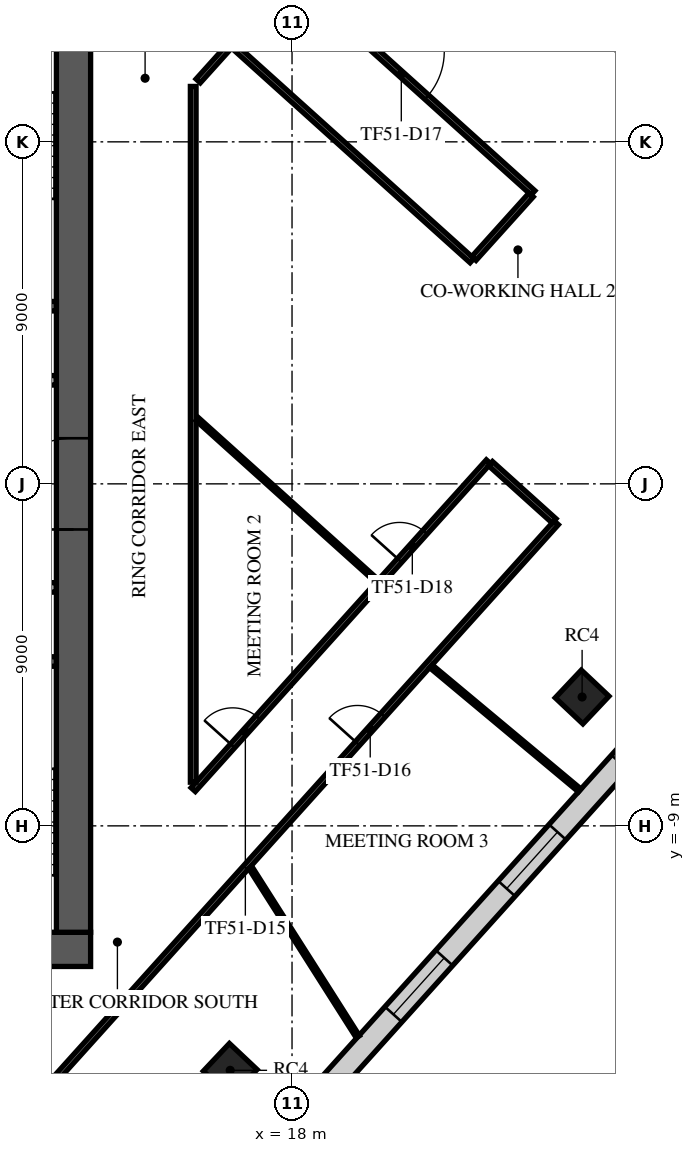
"""IFC4 building model, lengths in metres.
Left out: names, types, materials, properties, quantities, classifications, styles, units other than length and angle.
Written with IfcOpenShell. Run it as: python <this file> out.ifc"""

import sys

from ifc_helpers import new_model, si_unit, direction, frame, frame_2d, origin, origin_2d, place, context, subcontext, project, spatial, rectangle, extrude, element, fill, save


model = new_model("IFC4")
c1 = context("Model", 3, precision=1e-05, world=origin(), true_north=direction((0.0, 1.0)))
c2 = subcontext(c1, "Body", "Model", "MODEL_VIEW")
j1 = project(units=[si_unit("LENGTHUNIT", "METRE"), si_unit("PLANEANGLEUNIT", "RADIAN")], contexts=[c1])
p1 = place(None, origin())
s1 = spatial("IfcSite", under=j1, at=p1, CompositionType="ELEMENT")
p2 = place(p1, origin())
s2 = spatial("IfcBuilding", under=s1, at=p2, CompositionType="ELEMENT")
p3 = place(p2, frame((0.0, 0.0, 217.3)))
s3 = spatial("IfcBuildingStorey", under=s2, at=p3, CompositionType="ELEMENT", Elevation=217.3)
for number, where, z_axis, x_axis in (
    (1, (16.373, -15.433, 0.0), (0.0, 0.0, 1.0), (0.686, 0.728, 0.0)),
    (2, (25.633, -5.609, 0.0), (0.0, 0.0, 1.0), (0.686, 0.728, 0.0)),
    (3, (26.706, 11.931, 0.0), (0.0, 0.0, 1.0), (0.686, 0.728, 0.0)),
):
    element("IfcColumn", number, at=place(p3, frame(where, z_axis=z_axis, x_axis=x_axis)), inside=s3, PredefinedType="COLUMN", context=c2, shape_type="SweptSolid", body=[
        extrude(rectangle(XDim=1.0, YDim=1.0, at=origin_2d()), origin(), (0.0, 0.0, 1.0), 4.0),
    ])
p4 = place(p3, frame((-12.7, -12.25, 0.0), z_axis=(0.0, 0.0, 1.0), x_axis=(1.0, 0.0, 0.0)))
e4 = element("IfcWall", 4, at=p4, inside=s3, PredefinedType="SHEAR", context=c2, shape_type="SweptSolid", body=[
    extrude(rectangle(XDim=25.4, YDim=0.9, at=frame_2d((12.7, 0.0))), origin(), (0.0, 0.0, 1.0), 3.62),
])
p5 = place(p4, frame((7.6, 0.0, 0.0)))
e5 = element("IfcOpeningElement", 5, at=p5, cuts=e4, PredefinedType="OPENING", context=c2, shape_type="SweptSolid", body=[
    extrude(rectangle(XDim=2.0, YDim=2.1, at=frame_2d((1.0, 1.05))), frame((0.0, 0.46, 0.0), z_axis=(0.0, -1.0, 0.0), x_axis=(1.0, 0.0, 0.0)), (0.0, 0.0, 1.0), 0.92),
])
p6 = place(p4, frame((17.725, 0.0, 0.0)))
e6 = element("IfcOpeningElement", 6, at=p6, cuts=e4, PredefinedType="OPENING", context=c2, shape_type="SweptSolid", body=[
    extrude(rectangle(XDim=1.2, YDim=2.1, at=frame_2d((0.6, 1.05))), frame((0.0, 0.46, 0.0), z_axis=(0.0, -1.0, 0.0), x_axis=(1.0, 0.0, 0.0)), (0.0, 0.0, 1.0), 0.92),
])
p7 = place(p4, frame((1.875, 0.0, 0.0)))
e7 = element("IfcOpeningElement", 7, at=p7, cuts=e4, PredefinedType="OPENING", context=c2, shape_type="SweptSolid", body=[
    extrude(rectangle(XDim=1.2, YDim=2.1, at=frame_2d((0.6, 1.05))), frame((0.0, 0.46, 0.0), z_axis=(0.0, -1.0, 0.0), x_axis=(1.0, 0.0, 0.0)), (0.0, 0.0, 1.0), 0.92),
])
p8 = place(p4, frame((22.325, 0.0, 0.0)))
e8 = element("IfcOpeningElement", 8, at=p8, cuts=e4, PredefinedType="OPENING", context=c2, shape_type="SweptSolid", body=[
    extrude(rectangle(XDim=1.2, YDim=2.1, at=frame_2d((0.6, 1.05))), frame((0.0, 0.46, 0.0), z_axis=(0.0, -1.0, 0.0), x_axis=(1.0, 0.0, 0.0)), (0.0, 0.0, 1.0), 0.92),
])
p9 = place(p3, frame((12.25, -11.8, 0.0), z_axis=(0.0, 0.0, 1.0), x_axis=(0.0, 1.0, 0.0)))
e9 = element("IfcWall", 9, at=p9, inside=s3, PredefinedType="SHEAR", context=c2, shape_type="SweptSolid", body=[
    extrude(rectangle(XDim=23.6, YDim=0.9, at=frame_2d((11.8, 0.0))), origin(), (0.0, 0.0, 1.0), 3.62),
])
p10 = place(p9, frame((10.6, 0.0, 0.0)))
e10 = element("IfcOpeningElement", 10, at=p10, cuts=e9, PredefinedType="OPENING", context=c2, shape_type="SweptSolid", body=[
    extrude(rectangle(XDim=2.4, YDim=2.4, at=frame_2d((1.2, 1.2))), frame((0.0, 0.46, 0.0), z_axis=(0.0, -1.0, 0.0), x_axis=(1.0, 0.0, 0.0)), (0.0, 0.0, 1.0), 0.92),
])
for number, where, z_axis, x_axis in (
    (11, (8.65, 4.675, 0.0), (0.0, 0.0, 1.0), (1.0, 0.0, 0.0)),
    (12, (8.65, -4.675, 0.0), (0.0, 0.0, 1.0), (1.0, 0.0, 0.0)),
):
    element("IfcWall", number, at=place(p3, frame(where, z_axis=z_axis, x_axis=x_axis)), inside=s3, PredefinedType="SOLIDWALL", context=c2, shape_type="SweptSolid", body=[
        extrude(rectangle(XDim=3.15, YDim=0.25, at=frame_2d((1.575, 0.0))), origin(), (0.0, 0.0, 1.0), 3.62),
    ])
p11 = place(p3, frame((5.63, -2.725, 0.0), z_axis=(0.0, 0.0, 1.0), x_axis=(1.0, 0.0, 0.0)))
e13 = element("IfcWall", 13, at=p11, inside=s3, PredefinedType="PARTITIONING", context=c2, shape_type="SweptSolid", body=[
    extrude(rectangle(XDim=6.165, YDim=0.25, at=frame_2d((3.083, 0.0))), origin(), (0.0, 0.0, 1.0), 3.62),
])
p12 = place(p11, frame((0.745, 0.0, 0.0)))
e14 = element("IfcOpeningElement", 14, at=p12, cuts=e13, PredefinedType="OPENING", context=c2, shape_type="SweptSolid", body=[
    extrude(rectangle(XDim=1.0, YDim=2.1, at=frame_2d((0.5, 1.05))), frame((0.0, 0.135, 0.0), z_axis=(0.0, -1.0, 0.0), x_axis=(1.0, 0.0, 0.0)), (0.0, 0.0, 1.0), 0.27),
])
p13 = place(p11, frame((3.92, 0.0, 0.0)))
e15 = element("IfcOpeningElement", 15, at=p13, cuts=e13, PredefinedType="OPENING", context=c2, shape_type="SweptSolid", body=[
    extrude(rectangle(XDim=0.9, YDim=2.1, at=frame_2d((0.45, 1.05))), frame((0.0, 0.135, 0.0), z_axis=(0.0, -1.0, 0.0), x_axis=(1.0, 0.0, 0.0)), (0.0, 0.0, 1.0), 0.27),
])
p14 = place(p3, frame((8.38, 2.725, 0.0), z_axis=(0.0, 0.0, 1.0), x_axis=(1.0, 0.0, 0.0)))
e16 = element("IfcWall", 16, at=p14, inside=s3, PredefinedType="PARTITIONING", context=c2, shape_type="SweptSolid", body=[
    extrude(rectangle(XDim=3.415, YDim=0.25, at=frame_2d((1.708, 0.0))), origin(), (0.0, 0.0, 1.0), 3.62),
])
p15 = place(p14, frame((1.17, 0.0, 0.0)))
e17 = element("IfcOpeningElement", 17, at=p15, cuts=e16, PredefinedType="OPENING", context=c2, shape_type="SweptSolid", body=[
    extrude(rectangle(XDim=0.9, YDim=2.1, at=frame_2d((0.45, 1.05))), frame((0.0, 0.135, 0.0), z_axis=(0.0, -1.0, 0.0), x_axis=(1.0, 0.0, 0.0)), (0.0, 0.0, 1.0), 0.27),
])
p16 = place(p3, frame((1.962, -34.735, 0.0), z_axis=(0.0, 0.0, 1.0), x_axis=(0.669133181838, 0.743142506497, 0.0)))
e18 = element("IfcWall", 18, at=p16, inside=s3, PredefinedType="STANDARD", context=c2, shape_type="SweptSolid", body=[
    extrude(rectangle(XDim=49.0, YDim=0.6, at=frame_2d((24.5, 0.0))), origin(), (0.0, 0.0, 1.0), 3.62),
])
p17 = place(p16, frame((1.227, 0.0, 0.9)))
e19 = element("IfcOpeningElement", 19, at=p17, cuts=e18, PredefinedType="OPENING", context=c2, shape_type="SweptSolid", body=[
    extrude(rectangle(XDim=2.0, YDim=2.1, at=frame_2d((1.0, 1.05))), frame((0.0, 0.31, 0.0), z_axis=(0.0, -1.0, 0.0), x_axis=(1.0, 0.0, 0.0)), (0.0, 0.0, 1.0), 0.62),
])
p18 = place(p16, frame((5.682, 0.0, 0.9)))
e20 = element("IfcOpeningElement", 20, at=p18, cuts=e18, PredefinedType="OPENING", context=c2, shape_type="SweptSolid", body=[
    extrude(rectangle(XDim=2.0, YDim=2.1, at=frame_2d((1.0, 1.05))), frame((0.0, 0.31, 0.0), z_axis=(0.0, -1.0, 0.0), x_axis=(1.0, 0.0, 0.0)), (0.0, 0.0, 1.0), 0.62),
])
p19 = place(p16, frame((10.136, 0.0, 0.9)))
e21 = element("IfcOpeningElement", 21, at=p19, cuts=e18, PredefinedType="OPENING", context=c2, shape_type="SweptSolid", body=[
    extrude(rectangle(XDim=2.0, YDim=2.1, at=frame_2d((1.0, 1.05))), frame((0.0, 0.31, 0.0), z_axis=(0.0, -1.0, 0.0), x_axis=(1.0, 0.0, 0.0)), (0.0, 0.0, 1.0), 0.62),
])
p20 = place(p16, frame((14.591, 0.0, 0.9)))
e22 = element("IfcOpeningElement", 22, at=p20, cuts=e18, PredefinedType="OPENING", context=c2, shape_type="SweptSolid", body=[
    extrude(rectangle(XDim=2.0, YDim=2.1, at=frame_2d((1.0, 1.05))), frame((0.0, 0.31, 0.0), z_axis=(0.0, -1.0, 0.0), x_axis=(1.0, 0.0, 0.0)), (0.0, 0.0, 1.0), 0.62),
])
p21 = place(p16, frame((19.045, 0.0, 0.9)))
e23 = element("IfcOpeningElement", 23, at=p21, cuts=e18, PredefinedType="OPENING", context=c2, shape_type="SweptSolid", body=[
    extrude(rectangle(XDim=2.0, YDim=2.1, at=frame_2d((1.0, 1.05))), frame((0.0, 0.31, 0.0), z_axis=(0.0, -1.0, 0.0), x_axis=(1.0, 0.0, 0.0)), (0.0, 0.0, 1.0), 0.62),
])
p22 = place(p16, frame((23.5, 0.0, 0.9)))
e24 = element("IfcOpeningElement", 24, at=p22, cuts=e18, PredefinedType="OPENING", context=c2, shape_type="SweptSolid", body=[
    extrude(rectangle(XDim=2.0, YDim=2.1, at=frame_2d((1.0, 1.05))), frame((0.0, 0.31, 0.0), z_axis=(0.0, -1.0, 0.0), x_axis=(1.0, 0.0, 0.0)), (0.0, 0.0, 1.0), 0.62),
])
p23 = place(p16, frame((27.955, 0.0, 0.9)))
e25 = element("IfcOpeningElement", 25, at=p23, cuts=e18, PredefinedType="OPENING", context=c2, shape_type="SweptSolid", body=[
    extrude(rectangle(XDim=2.0, YDim=2.1, at=frame_2d((1.0, 1.05))), frame((0.0, 0.31, 0.0), z_axis=(0.0, -1.0, 0.0), x_axis=(1.0, 0.0, 0.0)), (0.0, 0.0, 1.0), 0.62),
])
p24 = place(p16, frame((32.409, 0.0, 0.9)))
e26 = element("IfcOpeningElement", 26, at=p24, cuts=e18, PredefinedType="OPENING", context=c2, shape_type="SweptSolid", body=[
    extrude(rectangle(XDim=2.0, YDim=2.1, at=frame_2d((1.0, 1.05))), frame((0.0, 0.31, 0.0), z_axis=(0.0, -1.0, 0.0), x_axis=(1.0, 0.0, 0.0)), (0.0, 0.0, 1.0), 0.62),
])
p25 = place(p16, frame((36.864, 0.0, 0.9)))
e27 = element("IfcOpeningElement", 27, at=p25, cuts=e18, PredefinedType="OPENING", context=c2, shape_type="SweptSolid", body=[
    extrude(rectangle(XDim=2.0, YDim=2.1, at=frame_2d((1.0, 1.05))), frame((0.0, 0.31, 0.0), z_axis=(0.0, -1.0, 0.0), x_axis=(1.0, 0.0, 0.0)), (0.0, 0.0, 1.0), 0.62),
])
p26 = place(p16, frame((41.318, 0.0, 0.9)))
e28 = element("IfcOpeningElement", 28, at=p26, cuts=e18, PredefinedType="OPENING", context=c2, shape_type="SweptSolid", body=[
    extrude(rectangle(XDim=2.0, YDim=2.1, at=frame_2d((1.0, 1.05))), frame((0.0, 0.31, 0.0), z_axis=(0.0, -1.0, 0.0), x_axis=(1.0, 0.0, 0.0)), (0.0, 0.0, 1.0), 0.62),
])
p27 = place(p16, frame((45.773, 0.0, 0.9)))
e29 = element("IfcOpeningElement", 29, at=p27, cuts=e18, PredefinedType="OPENING", context=c2, shape_type="SweptSolid", body=[
    extrude(rectangle(XDim=2.0, YDim=2.1, at=frame_2d((1.0, 1.05))), frame((0.0, 0.31, 0.0), z_axis=(0.0, -1.0, 0.0), x_axis=(1.0, 0.0, 0.0)), (0.0, 0.0, 1.0), 0.62),
])
p28 = place(p3, frame((34.365, 9.023, 0.0), z_axis=(0.0, 0.0, 1.0), x_axis=(-0.743146896498, 0.66912830625, 0.0)))
e30 = element("IfcWall", 30, at=p28, inside=s3, PredefinedType="STANDARD", context=c2, shape_type="SweptSolid", body=[
    extrude(rectangle(XDim=39.0, YDim=0.6, at=frame_2d((19.5, 0.0))), origin(), (0.0, 0.0, 1.0), 3.62),
])
p29 = place(p28, frame((1.217, 0.0, 0.9)))
e31 = element("IfcOpeningElement", 31, at=p29, cuts=e30, PredefinedType="OPENING", context=c2, shape_type="SweptSolid", body=[
    extrude(rectangle(XDim=1.9, YDim=2.1, at=frame_2d((0.95, 1.05))), frame((0.0, 0.31, 0.0), z_axis=(0.0, -1.0, 0.0), x_axis=(1.0, 0.0, 0.0)), (0.0, 0.0, 1.0), 0.62),
])
p30 = place(p28, frame((5.55, 0.0, 0.9)))
e32 = element("IfcOpeningElement", 32, at=p30, cuts=e30, PredefinedType="OPENING", context=c2, shape_type="SweptSolid", body=[
    extrude(rectangle(XDim=1.9, YDim=2.1, at=frame_2d((0.95, 1.05))), frame((0.0, 0.31, 0.0), z_axis=(0.0, -1.0, 0.0), x_axis=(1.0, 0.0, 0.0)), (0.0, 0.0, 1.0), 0.62),
])
p31 = place(p28, frame((9.883, 0.0, 0.9)))
e33 = element("IfcOpeningElement", 33, at=p31, cuts=e30, PredefinedType="OPENING", context=c2, shape_type="SweptSolid", body=[
    extrude(rectangle(XDim=1.9, YDim=2.1, at=frame_2d((0.95, 1.05))), frame((0.0, 0.31, 0.0), z_axis=(0.0, -1.0, 0.0), x_axis=(1.0, 0.0, 0.0)), (0.0, 0.0, 1.0), 0.62),
])
p32 = place(p28, frame((14.217, 0.0, 0.9)))
e34 = element("IfcOpeningElement", 34, at=p32, cuts=e30, PredefinedType="OPENING", context=c2, shape_type="SweptSolid", body=[
    extrude(rectangle(XDim=1.9, YDim=2.1, at=frame_2d((0.95, 1.05))), frame((0.0, 0.31, 0.0), z_axis=(0.0, -1.0, 0.0), x_axis=(1.0, 0.0, 0.0)), (0.0, 0.0, 1.0), 0.62),
])
p33 = place(p28, frame((18.55, 0.0, 0.9)))
e35 = element("IfcOpeningElement", 35, at=p33, cuts=e30, PredefinedType="OPENING", context=c2, shape_type="SweptSolid", body=[
    extrude(rectangle(XDim=1.9, YDim=2.1, at=frame_2d((0.95, 1.05))), frame((0.0, 0.31, 0.0), z_axis=(0.0, -1.0, 0.0), x_axis=(1.0, 0.0, 0.0)), (0.0, 0.0, 1.0), 0.62),
])
p34 = place(p28, frame((22.883, 0.0, 0.9)))
e36 = element("IfcOpeningElement", 36, at=p34, cuts=e30, PredefinedType="OPENING", context=c2, shape_type="SweptSolid", body=[
    extrude(rectangle(XDim=1.9, YDim=2.1, at=frame_2d((0.95, 1.05))), frame((0.0, 0.31, 0.0), z_axis=(0.0, -1.0, 0.0), x_axis=(1.0, 0.0, 0.0)), (0.0, 0.0, 1.0), 0.62),
])
p35 = place(p28, frame((27.217, 0.0, 0.9)))
e37 = element("IfcOpeningElement", 37, at=p35, cuts=e30, PredefinedType="OPENING", context=c2, shape_type="SweptSolid", body=[
    extrude(rectangle(XDim=1.9, YDim=2.1, at=frame_2d((0.95, 1.05))), frame((0.0, 0.31, 0.0), z_axis=(0.0, -1.0, 0.0), x_axis=(1.0, 0.0, 0.0)), (0.0, 0.0, 1.0), 0.62),
])
p36 = place(p28, frame((31.55, 0.0, 0.9)))
e38 = element("IfcOpeningElement", 38, at=p36, cuts=e30, PredefinedType="OPENING", context=c2, shape_type="SweptSolid", body=[
    extrude(rectangle(XDim=1.9, YDim=2.1, at=frame_2d((0.95, 1.05))), frame((0.0, 0.31, 0.0), z_axis=(0.0, -1.0, 0.0), x_axis=(1.0, 0.0, 0.0)), (0.0, 0.0, 1.0), 0.62),
])
p37 = place(p28, frame((35.883, 0.0, 0.9)))
e39 = element("IfcOpeningElement", 39, at=p37, cuts=e30, PredefinedType="OPENING", context=c2, shape_type="SweptSolid", body=[
    extrude(rectangle(XDim=1.9, YDim=2.1, at=frame_2d((0.95, 1.05))), frame((0.0, 0.31, 0.0), z_axis=(0.0, -1.0, 0.0), x_axis=(1.0, 0.0, 0.0)), (0.0, 0.0, 1.0), 0.62),
])
p38 = place(p3, frame((3.676, -24.653, 0.0), z_axis=(0.0, 0.0, 1.0), x_axis=(0.669124220942, 0.743150574882, 0.0)))
e40 = element("IfcWall", 40, at=p38, inside=s3, PredefinedType="PARTITIONING", context=c2, shape_type="SweptSolid", body=[
    extrude(rectangle(XDim=31.796, YDim=0.15, at=frame_2d((15.898, 0.0))), origin(), (0.0, 0.0, 1.0), 3.17),
])
p39 = place(p38, frame((9.41, 0.0, 0.0)))
e41 = element("IfcOpeningElement", 41, at=p39, cuts=e40, PredefinedType="OPENING", context=c2, shape_type="SweptSolid", body=[
    extrude(rectangle(XDim=1.0, YDim=2.1, at=frame_2d((0.5, 1.05))), frame((0.0, 0.085, 0.0), z_axis=(0.0, -1.0, 0.0), x_axis=(1.0, 0.0, 0.0)), (0.0, 0.0, 1.0), 0.17),
])
p40 = place(p38, frame((23.981, 0.0, 0.0)))
e42 = element("IfcOpeningElement", 42, at=p40, cuts=e40, PredefinedType="OPENING", context=c2, shape_type="SweptSolid", body=[
    extrude(rectangle(XDim=1.0, YDim=2.1, at=frame_2d((0.5, 1.05))), frame((0.0, 0.085, 0.0), z_axis=(0.0, -1.0, 0.0), x_axis=(1.0, 0.0, 0.0)), (0.0, 0.0, 1.0), 0.17),
])
p41 = place(p3, frame((5.128, 24.958, 0.0), z_axis=(0.0, 0.0, 1.0), x_axis=(0.743144813636, -0.66913061951, 0.0)))
e43 = element("IfcWall", 43, at=p41, inside=s3, PredefinedType="PARTITIONING", context=c2, shape_type="SweptSolid", body=[
    extrude(rectangle(XDim=25.854, YDim=0.15, at=frame_2d((12.927, 0.0))), origin(), (0.0, 0.0, 1.0), 3.17),
])
p42 = place(p41, frame((8.946, 0.0, 0.0)))
e44 = element("IfcOpeningElement", 44, at=p42, cuts=e43, PredefinedType="OPENING", context=c2, shape_type="SweptSolid", body=[
    extrude(rectangle(XDim=1.0, YDim=2.1, at=frame_2d((0.5, 1.05))), frame((0.0, 0.085, 0.0), z_axis=(0.0, -1.0, 0.0), x_axis=(1.0, 0.0, 0.0)), (0.0, 0.0, 1.0), 0.17),
])
p43 = place(p41, frame((20.29, 0.0, 0.0)))
e45 = element("IfcOpeningElement", 45, at=p43, cuts=e43, PredefinedType="OPENING", context=c2, shape_type="SweptSolid", body=[
    extrude(rectangle(XDim=1.8, YDim=2.1, at=frame_2d((0.9, 1.05))), frame((0.0, 0.085, 0.0), z_axis=(0.0, -1.0, 0.0), x_axis=(1.0, 0.0, 0.0)), (0.0, 0.0, 1.0), 0.17),
])
p44 = place(p3, frame((15.4, -8.046, 0.0), z_axis=(0.0, 0.0, 1.0), x_axis=(0.669150592904, 0.743126829025, 0.0)))
e46 = element("IfcWall", 46, at=p44, inside=s3, PredefinedType="PARTITIONING", context=c2, shape_type="SweptSolid", body=[
    extrude(rectangle(XDim=11.61, YDim=0.15, at=frame_2d((5.805, 0.0))), origin(), (0.0, 0.0, 1.0), 3.17),
])
p45 = place(p44, frame((1.55, 0.0, 0.0)))
e47 = element("IfcOpeningElement", 47, at=p45, cuts=e46, PredefinedType="OPENING", context=c2, shape_type="SweptSolid", body=[
    extrude(rectangle(XDim=1.0, YDim=2.1, at=frame_2d((0.5, 1.05))), frame((0.0, 0.085, 0.0), z_axis=(0.0, -1.0, 0.0), x_axis=(1.0, 0.0, 0.0)), (0.0, 0.0, 1.0), 0.17),
])
p46 = place(p44, frame((8.116, 0.0, 0.0)))
e48 = element("IfcOpeningElement", 48, at=p46, cuts=e46, PredefinedType="OPENING", context=c2, shape_type="SweptSolid", body=[
    extrude(rectangle(XDim=1.0, YDim=2.1, at=frame_2d((0.5, 1.05))), frame((0.0, 0.085, 0.0), z_axis=(0.0, -1.0, 0.0), x_axis=(1.0, 0.0, 0.0)), (0.0, 0.0, 1.0), 0.17),
])
p47 = place(p3, frame((15.4, -7.851, 0.0), z_axis=(0.0, 0.0, 1.0), x_axis=(0.0, 1.0, 0.0)))
e49 = element("IfcWall", 49, at=p47, inside=s3, PredefinedType="PARTITIONING", context=c2, shape_type="SweptSolid", body=[
    extrude(rectangle(XDim=18.309, YDim=0.15, at=frame_2d((9.154, 0.0))), origin(), (0.0, 0.0, 1.0), 3.17),
])
p48 = place(p3, frame((15.531, 10.603, 0.0), z_axis=(0.0, 0.0, 1.0), x_axis=(0.669233140763, 0.743052490275, 0.0)))
e50 = element("IfcWall", 50, at=p48, inside=s3, PredefinedType="PARTITIONING", context=c2, shape_type="SweptSolid", body=[
    extrude(rectangle(XDim=1.306, YDim=0.15, at=frame_2d((0.653, 0.0))), origin(), (0.0, 0.0, 1.0), 3.17),
])
p49 = place(p3, frame((16.461, 11.524, 0.0), z_axis=(0.0, 0.0, 1.0), x_axis=(0.743193483902, -0.669076561752, 0.0)))
e51 = element("IfcWall", 51, at=p49, inside=s3, PredefinedType="PARTITIONING", context=c2, shape_type="SweptSolid", body=[
    extrude(rectangle(XDim=8.442, YDim=0.15, at=frame_2d((4.221, 0.0))), origin(), (0.0, 0.0, 1.0), 3.17),
])
for number, where, z_axis, x_axis in (
    (52, (22.785, 5.931, 0.0), (0.0, 0.0, 1.0), (0.669, 0.743, 0.0)),
    (53, (23.225, 0.532, 0.0), (0.0, 0.0, 1.0), (0.743, -0.669, 0.0)),
):
    element("IfcWall", number, at=place(p3, frame(where, z_axis=z_axis, x_axis=x_axis)), inside=s3, PredefinedType="PARTITIONING", context=c2, shape_type="SweptSolid", body=[
        extrude(rectangle(XDim=2.25, YDim=0.15, at=frame_2d((1.125, 0.0))), origin(), (0.0, 0.0, 1.0), 3.17),
    ])
p50 = place(p3, frame((15.509, 1.7, 0.0), z_axis=(0.0, 0.0, 1.0), x_axis=(0.743166359939, -0.669106689142, 0.0)))
e54 = element("IfcWall", 54, at=p50, inside=s3, PredefinedType="PARTITIONING", context=c2, shape_type="SweptSolid", body=[
    extrude(rectangle(XDim=6.366, YDim=0.1, at=frame_2d((3.183, 0.0))), origin(), (0.0, 0.0, 1.0), 3.17),
])
p51 = place(p3, frame((16.902, -10.096, 0.0), z_axis=(0.0, 0.0, 1.0), x_axis=(0.536270420215, -0.84404622883, 0.0)))
e55 = element("IfcWall", 55, at=p51, inside=s3, PredefinedType="PARTITIONING", context=c2, shape_type="SweptSolid", body=[
    extrude(rectangle(XDim=5.275, YDim=0.1, at=frame_2d((2.638, 0.0))), origin(), (0.0, 0.0, 1.0), 2.97),
])
p52 = place(p3, frame((21.655, -4.8, 0.0), z_axis=(0.0, 0.0, 1.0), x_axis=(0.767785292275, -0.640707222501, 0.0)))
e56 = element("IfcWall", 56, at=p52, inside=s3, PredefinedType="PARTITIONING", context=c2, shape_type="SweptSolid", body=[
    extrude(rectangle(XDim=5.097, YDim=0.1, at=frame_2d((2.548, 0.0))), origin(), (0.0, 0.0, 1.0), 2.97),
])
p53 = place(p10, origin())
e57 = element("IfcDoor", 57, at=p53, inside=s3, OperationType="SINGLE_SWING_LEFT", PredefinedType="DOOR", context=c2, shape_type="SweptSolid", body=[
    extrude(rectangle(XDim=2.4, YDim=2.4, at=frame_2d((1.2, 1.2))), frame((0.0, 0.025, 0.0), z_axis=(0.0, -1.0, 0.0), x_axis=(1.0, 0.0, 0.0)), (0.0, 0.0, 1.0), 0.05),
])
fill(e10, e57)
p54 = place(p23, origin())
e58 = element("IfcWindow", 58, at=p54, inside=s3, PartitioningType="SINGLE_PANEL", PredefinedType="WINDOW", context=c2, shape_type="SweptSolid", body=[
    extrude(rectangle(XDim=2.0, YDim=2.1, at=frame_2d((1.0, 1.05))), frame((0.0, 0.03, 0.0), z_axis=(0.0, -1.0, 0.0), x_axis=(1.0, 0.0, 0.0)), (0.0, 0.0, 1.0), 0.06),
])
fill(e25, e58)
p55 = place(p24, origin())
e59 = element("IfcWindow", 59, at=p55, inside=s3, PartitioningType="SINGLE_PANEL", PredefinedType="WINDOW", context=c2, shape_type="SweptSolid", body=[
    extrude(rectangle(XDim=2.0, YDim=2.1, at=frame_2d((1.0, 1.05))), frame((0.0, 0.03, 0.0), z_axis=(0.0, -1.0, 0.0), x_axis=(1.0, 0.0, 0.0)), (0.0, 0.0, 1.0), 0.06),
])
fill(e26, e59)
p56 = place(p45, origin())
e60 = element("IfcDoor", 60, at=p56, inside=s3, OperationType="SINGLE_SWING_LEFT", PredefinedType="DOOR", context=c2, shape_type="SweptSolid", body=[
    extrude(rectangle(XDim=1.0, YDim=2.1, at=frame_2d((0.5, 1.05))), frame((0.0, 0.025, 0.0), z_axis=(0.0, -1.0, 0.0), x_axis=(1.0, 0.0, 0.0)), (0.0, 0.0, 1.0), 0.05),
])
fill(e47, e60)
p57 = place(p40, frame((1.0, 0.0, 0.0), z_axis=(0.0, 0.0, 1.0), x_axis=(-1.0, 0.0, 0.0)))
e61 = element("IfcDoor", 61, at=p57, inside=s3, OperationType="SINGLE_SWING_LEFT", PredefinedType="DOOR", context=c2, shape_type="SweptSolid", body=[
    extrude(rectangle(XDim=1.0, YDim=2.1, at=frame_2d((0.5, 1.05))), frame((0.0, 0.025, 0.0), z_axis=(0.0, -1.0, 0.0), x_axis=(1.0, 0.0, 0.0)), (0.0, 0.0, 1.0), 0.05),
])
fill(e42, e61)
p58 = place(p43, origin())
e62 = element("IfcDoor", 62, at=p58, inside=s3, OperationType="DOUBLE_DOOR_SINGLE_SWING", PredefinedType="DOOR", context=c2, shape_type="SweptSolid", body=[
    extrude(rectangle(XDim=1.8, YDim=2.1, at=frame_2d((0.9, 1.05))), frame((0.0, 0.025, 0.0), z_axis=(0.0, -1.0, 0.0), x_axis=(1.0, 0.0, 0.0)), (0.0, 0.0, 1.0), 0.05),
])
fill(e45, e62)
p59 = place(p46, origin())
e63 = element("IfcDoor", 63, at=p59, inside=s3, OperationType="SINGLE_SWING_LEFT", PredefinedType="DOOR", context=c2, shape_type="SweptSolid", body=[
    extrude(rectangle(XDim=1.0, YDim=2.1, at=frame_2d((0.5, 1.05))), frame((0.0, 0.025, 0.0), z_axis=(0.0, -1.0, 0.0), x_axis=(1.0, 0.0, 0.0)), (0.0, 0.0, 1.0), 0.05),
])
fill(e48, e63)
save(model, sys.argv[1])
